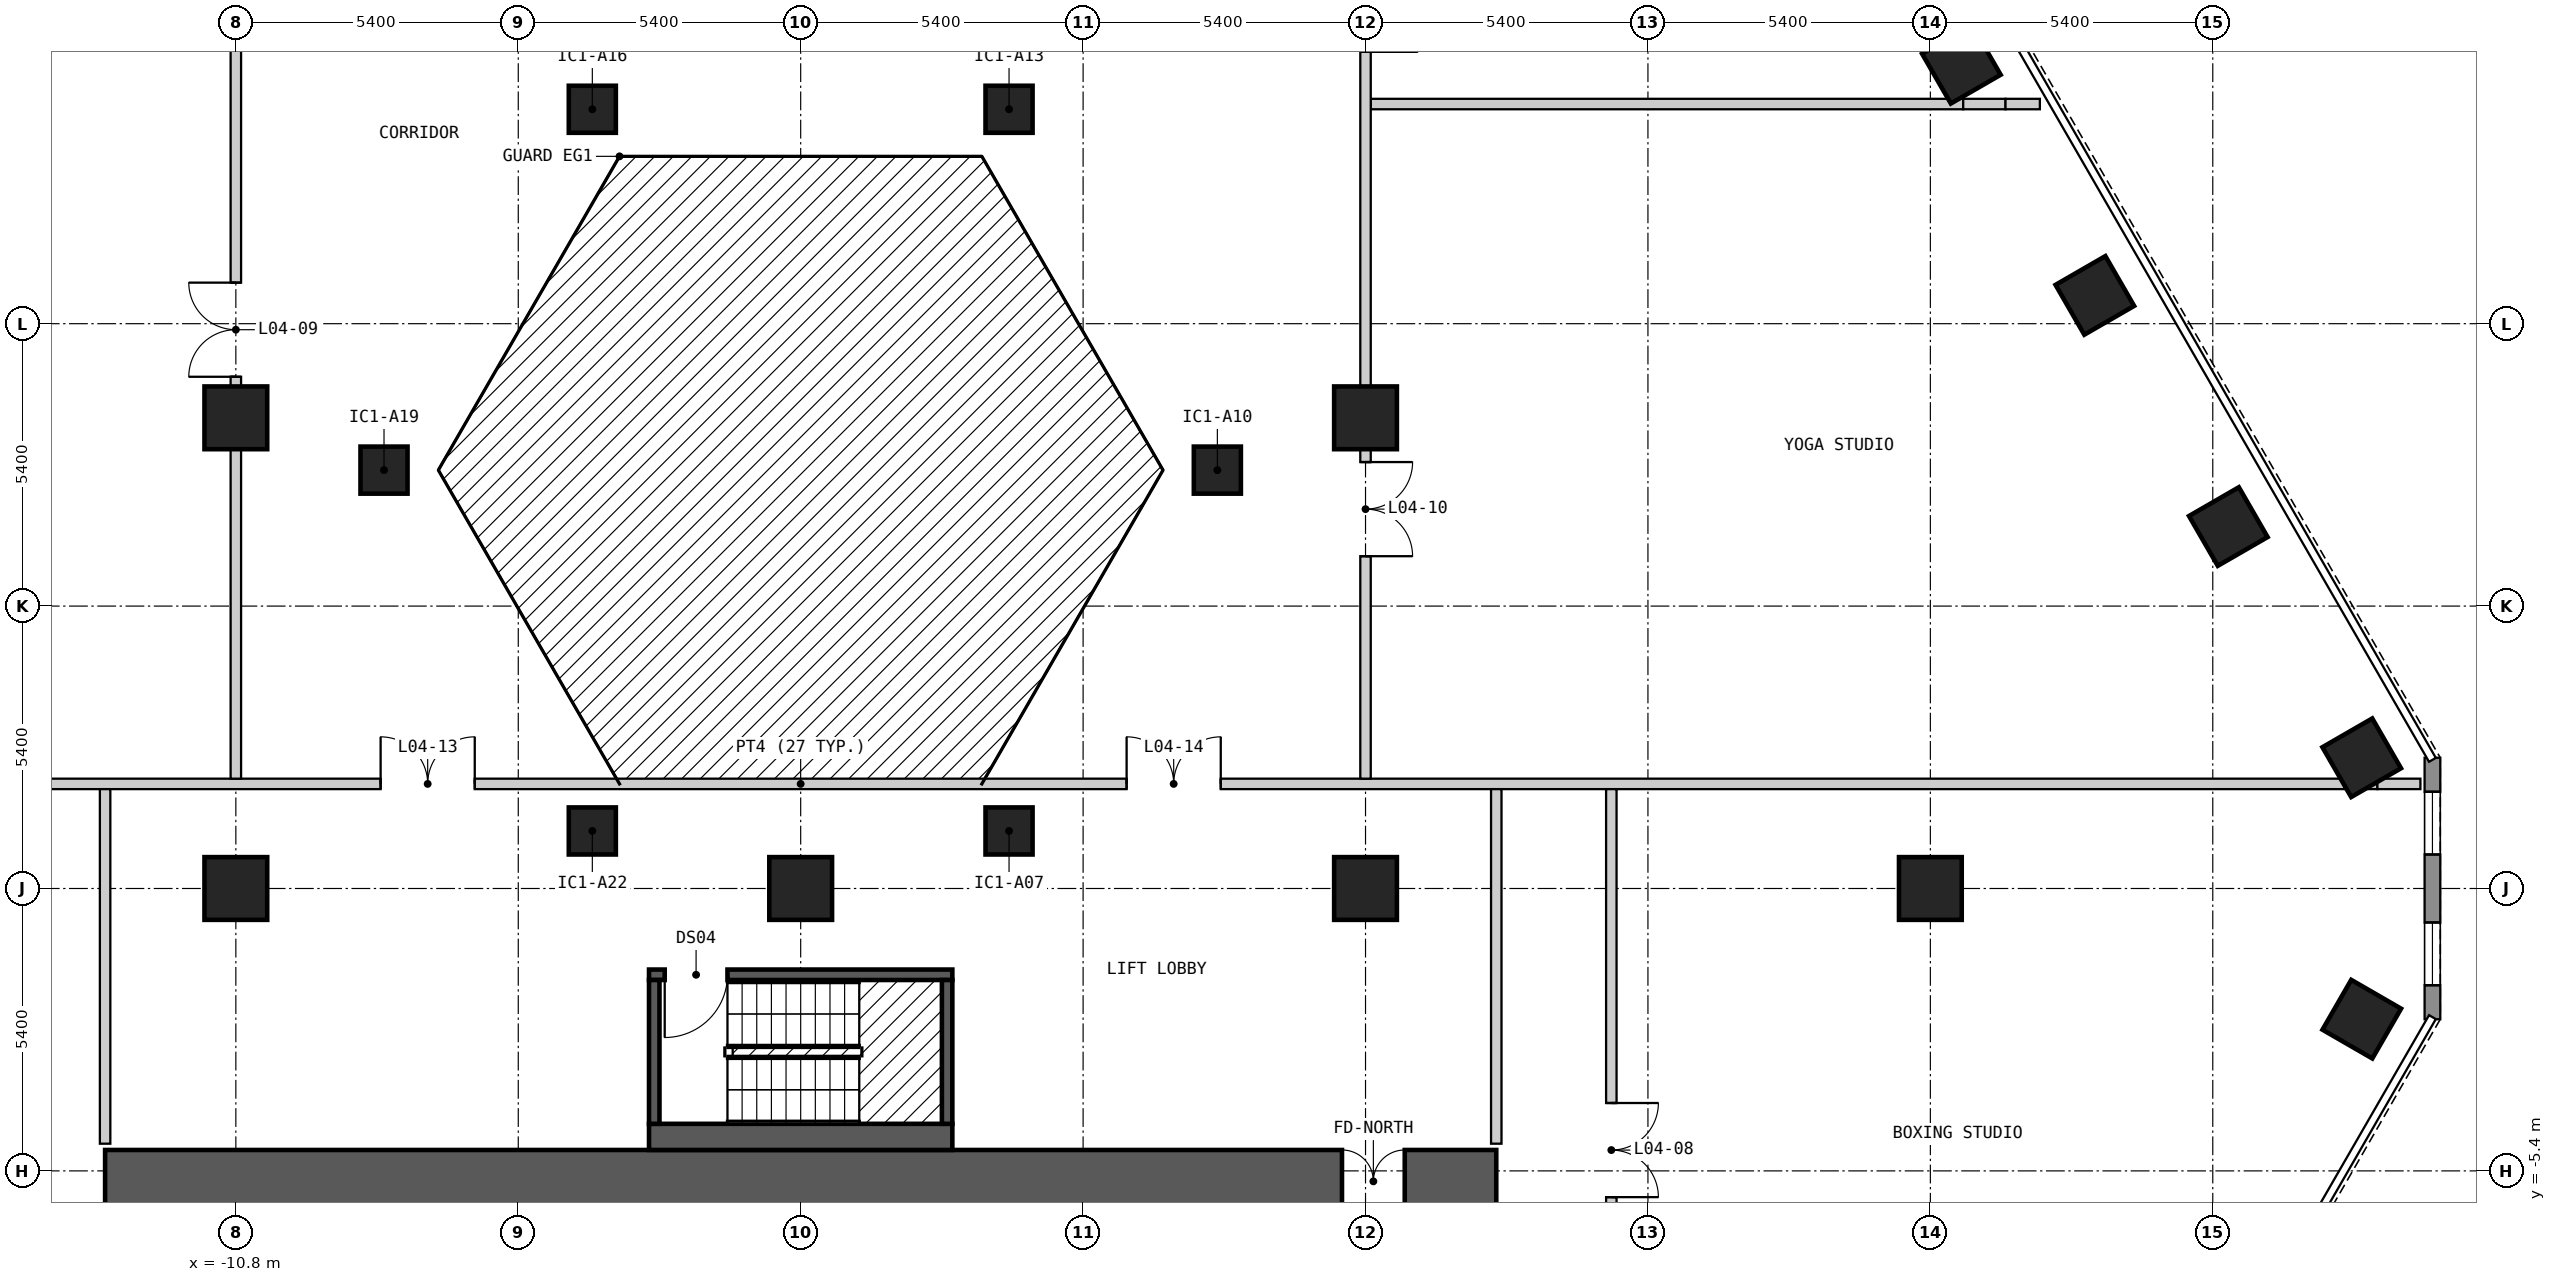
"""IFC4 building model, lengths in metres.
Left out: names, types, materials, properties, quantities, classifications, styles, units other than length and angle.
Written with IfcOpenShell. Run it as: python <this file> out.ifc"""

import sys

from ifc_helpers import new_model, si_unit, direction, frame, frame_2d, origin, origin_2d, place, context, subcontext, project, spatial, polyline, rectangle, outline, extrude, element, fill, save


model = new_model("IFC4")
c1 = context("Model", 3, precision=1e-05, world=origin(), true_north=direction((0.0, 1.0)))
c2 = subcontext(c1, "Body", "Model", "MODEL_VIEW")
j1 = project(units=[si_unit("LENGTHUNIT", "METRE"), si_unit("PLANEANGLEUNIT", "RADIAN")], contexts=[c1])
p1 = place(None, origin())
s1 = spatial("IfcSite", under=j1, at=p1, CompositionType="ELEMENT")
p2 = place(p1, origin())
s2 = spatial("IfcBuilding", under=s1, at=p2, CompositionType="ELEMENT")
p3 = place(p2, frame((0.0, 0.0, 16.2)))
s3 = spatial("IfcBuildingStorey", under=s2, at=p3, CompositionType="ELEMENT", Elevation=16.2)
for number, where, z_axis, x_axis in (
    (1, (29.849, -2.499, 0.0), (0.0, 0.0, 1.0), (0.5, 0.866, 0.0)),
    (2, (29.848, 2.5, 0.0), (0.0, 0.0, 1.0), (-0.5, 0.866, 0.0)),
    (3, (27.297, 6.921, 0.0), (0.0, 0.0, 1.0), (-0.5, 0.866, 0.0)),
    (4, (24.745, 11.341, 0.0), (0.0, 0.0, 1.0), (-0.5, 0.866, 0.0)),
    (5, (22.193, 15.761, 0.0), (0.0, 0.0, 1.0), (-0.5, 0.866, 0.0)),
):
    element("IfcColumn", number, at=place(p3, frame(where, z_axis=z_axis, x_axis=x_axis)), inside=s3, PredefinedType="COLUMN", context=c2, shape_type="SweptSolid", body=[
        extrude(rectangle(XDim=1.1, YDim=1.1, at=origin_2d()), origin(), (0.0, 0.0, 1.0), 3.6),
    ])
for number, where, z_axis, x_axis in (
    (6, (3.984, 1.1, 0.0), (0.0, 0.0, 1.0), (1.0, 0.0, 0.0)),
    (7, (7.967, 8.0, 0.0), (0.0, 0.0, 1.0), (1.0, 0.0, 0.0)),
    (8, (3.984, 14.9, 0.0), (0.0, 0.0, 1.0), (1.0, 0.0, 0.0)),
    (9, (-3.984, 14.9, 0.0), (0.0, 0.0, 1.0), (1.0, 0.0, 0.0)),
    (10, (-7.967, 8.0, 0.0), (0.0, 0.0, 1.0), (1.0, 0.0, 0.0)),
    (11, (-3.984, 1.1, 0.0), (0.0, 0.0, 1.0), (1.0, 0.0, 0.0)),
):
    element("IfcColumn", number, at=place(p3, frame(where, z_axis=z_axis, x_axis=x_axis)), inside=s3, PredefinedType="COLUMN", context=c2, shape_type="SweptSolid", body=[
        extrude(rectangle(XDim=0.9, YDim=0.9, at=origin_2d()), origin(), (0.0, 0.0, 1.0), 3.6),
    ])
for number, where, z_axis, x_axis in (
    (12, (-10.8, 0.0, 0.0), (0.0, 0.0, 1.0), (1.0, 0.0, 0.0)),
    (13, (-10.8, 9.0, 0.0), (0.0, 0.0, 1.0), (1.0, 0.0, 0.0)),
    (14, (0.0, 0.0, 0.0), (0.0, 0.0, 1.0), (1.0, 0.0, 0.0)),
    (15, (10.8, 0.0, 0.0), (0.0, 0.0, 1.0), (1.0, 0.0, 0.0)),
    (16, (10.8, 9.0, 0.0), (0.0, 0.0, 1.0), (1.0, 0.0, 0.0)),
    (17, (21.6, 0.0, 0.0), (0.0, 0.0, 1.0), (1.0, 0.0, 0.0)),
):
    element("IfcColumn", number, at=place(p3, frame(where, z_axis=z_axis, x_axis=x_axis)), inside=s3, PredefinedType="COLUMN", context=c2, shape_type="SweptSolid", body=[
        extrude(rectangle(XDim=1.2, YDim=1.2, at=origin_2d()), origin(), (0.0, 0.0, 1.0), 3.6),
    ])
p4 = place(p3, frame((-13.3, -5.6, 0.0), z_axis=(0.0, 0.0, 1.0), x_axis=(1.0, 0.0, 0.0)))
e18 = element("IfcWall", 18, at=p4, inside=s3, PredefinedType="SHEAR", context=c2, shape_type="SweptSolid", body=[
    extrude(rectangle(XDim=26.6, YDim=1.2, at=frame_2d((13.3, 0.0))), origin(), (0.0, 0.0, 1.0), 3.25),
])
p5 = place(p4, frame((23.65, 0.0, 0.0)))
e19 = element("IfcOpeningElement", 19, at=p5, cuts=e18, PredefinedType="OPENING", context=c2, shape_type="SweptSolid", body=[
    extrude(rectangle(XDim=1.2, YDim=2.1, at=frame_2d((0.6, 1.05))), frame((0.0, 0.61, 0.0), z_axis=(0.0, -1.0, 0.0), x_axis=(1.0, 0.0, 0.0)), (0.0, 0.0, 1.0), 1.22),
])
p6 = place(p3, frame((31.2, -2.5, 0.0), z_axis=(0.0, 0.0, 1.0), x_axis=(0.0, 1.0, 0.0)))
e20 = element("IfcWall", 20, at=p6, inside=s3, PredefinedType="SOLIDWALL", context=c2, shape_type="SweptSolid", body=[
    extrude(outline(polyline([(0.0, -0.15), (5.0, -0.15), (4.92, 0.15), (0.08, 0.15), (0.0, -0.15)])), origin(), (0.0, 0.0, 1.0), 3.25),
])
p7 = place(p6, frame((0.65, 0.0, 0.15)))
e21 = element("IfcOpeningElement", 21, at=p7, cuts=e20, PredefinedType="OPENING", context=c2, shape_type="SweptSolid", body=[
    extrude(rectangle(XDim=1.2, YDim=2.1, at=frame_2d((0.6, 1.05))), frame((0.0, 0.16, 0.0), z_axis=(0.0, -1.0, 0.0), x_axis=(1.0, 0.0, 0.0)), (0.0, 0.0, 1.0), 0.32),
])
p8 = place(p6, frame((3.15, 0.0, 0.15)))
e22 = element("IfcOpeningElement", 22, at=p8, cuts=e20, PredefinedType="OPENING", context=c2, shape_type="SweptSolid", body=[
    extrude(rectangle(XDim=1.2, YDim=2.1, at=frame_2d((0.6, 1.05))), frame((0.0, 0.16, 0.0), z_axis=(0.0, -1.0, 0.0), x_axis=(1.0, 0.0, 0.0)), (0.0, 0.0, 1.0), 0.32),
])
p9 = place(p3, frame((-2.9, -4.75, 0.0), z_axis=(0.0, 0.0, 1.0), x_axis=(1.0, 0.0, 0.0)))
e23 = element("IfcWall", 23, at=p9, inside=s3, PredefinedType="SOLIDWALL", context=c2, shape_type="SweptSolid", body=[
    extrude(rectangle(XDim=5.8, YDim=0.5, at=frame_2d((2.9, 0.0))), origin(), (0.0, 0.0, 1.0), 3.25),
])
p10 = place(p3, frame((-2.9, -1.65, 0.0), z_axis=(0.0, 0.0, 1.0), x_axis=(1.0, 0.0, 0.0)))
e24 = element("IfcWall", 24, at=p10, inside=s3, PredefinedType="SOLIDWALL", context=c2, shape_type="SweptSolid", body=[
    extrude(rectangle(XDim=5.8, YDim=0.2, at=frame_2d((2.9, 0.0))), origin(), (0.0, 0.0, 1.0), 3.25),
])
p11 = place(p10, frame((0.3, 0.0, 0.0)))
e25 = element("IfcOpeningElement", 25, at=p11, cuts=e24, PredefinedType="OPENING", context=c2, shape_type="SweptSolid", body=[
    extrude(rectangle(XDim=1.2, YDim=2.1, at=frame_2d((0.6, 1.05))), frame((0.0, 0.11, 0.0), z_axis=(0.0, -1.0, 0.0), x_axis=(1.0, 0.0, 0.0)), (0.0, 0.0, 1.0), 0.22),
])
for number, where, z_axis, x_axis in (
    (26, (-2.8, -4.5, 0.0), (0.0, 0.0, 1.0), (0.0, 1.0, 0.0)),
    (27, (2.8, -4.5, 0.0), (0.0, 0.0, 1.0), (0.0, 1.0, 0.0)),
):
    element("IfcWall", number, at=place(p3, frame(where, z_axis=z_axis, x_axis=x_axis)), inside=s3, PredefinedType="SOLIDWALL", context=c2, shape_type="SweptSolid", body=[
        extrude(rectangle(XDim=2.75, YDim=0.2, at=frame_2d((1.375, 0.0))), origin(), (0.0, 0.0, 1.0), 3.25),
    ])
p12 = place(p3, frame((-29.549, 2.0, 0.0), z_axis=(0.0, 0.0, 1.0), x_axis=(1.0, 0.0, 0.0)))
e28 = element("IfcWall", 28, at=p12, inside=s3, PredefinedType="PARTITIONING", context=c2, shape_type="SweptSolid", body=[
    extrude(rectangle(XDim=59.097, YDim=0.2, at=frame_2d((29.549, 0.0))), origin(), (0.0, 0.0, 1.0), 3.25),
])
p13 = place(p12, frame((21.517, 0.0, 0.0)))
e29 = element("IfcOpeningElement", 29, at=p13, cuts=e28, PredefinedType="OPENING", context=c2, shape_type="SweptSolid", body=[
    extrude(rectangle(XDim=1.8, YDim=2.1, at=frame_2d((0.9, 1.05))), frame((0.0, 0.11, 0.0), z_axis=(0.0, -1.0, 0.0), x_axis=(1.0, 0.0, 0.0)), (0.0, 0.0, 1.0), 0.22),
])
p14 = place(p12, frame((35.781, 0.0, 0.0)))
e30 = element("IfcOpeningElement", 30, at=p14, cuts=e28, PredefinedType="OPENING", context=c2, shape_type="SweptSolid", body=[
    extrude(rectangle(XDim=1.8, YDim=2.1, at=frame_2d((0.9, 1.05))), frame((0.0, 0.11, 0.0), z_axis=(0.0, -1.0, 0.0), x_axis=(1.0, 0.0, 0.0)), (0.0, 0.0, 1.0), 0.22),
])
p15 = place(p3, frame((29.548, 2.0, 0.0), z_axis=(0.0, 0.0, 1.0), x_axis=(1.0, 0.0, 0.0)))
e31 = element("IfcWall", 31, at=p15, inside=s3, PredefinedType="PARTITIONING", context=c2, shape_type="SweptSolid", body=[
    extrude(rectangle(XDim=0.6, YDim=0.2, at=frame_2d((0.3, 0.0))), origin(), (0.0, 0.0, 1.0), 2.52),
])
p16 = place(p3, frame((30.148, 2.0, 0.0), z_axis=(0.0, 0.0, 1.0), x_axis=(1.0, 0.0, 0.0)))
e32 = element("IfcWall", 32, at=p16, inside=s3, PredefinedType="PARTITIONING", context=c2, shape_type="SweptSolid", body=[
    extrude(rectangle(XDim=0.822, YDim=0.2, at=frame_2d((0.411, 0.0))), origin(), (0.0, 0.0, 1.0), 3.25),
])
p17 = place(p3, frame((10.9, 15.0, 0.0), z_axis=(0.0, 0.0, 1.0), x_axis=(1.0, 0.0, 0.0)))
e33 = element("IfcWall", 33, at=p17, inside=s3, PredefinedType="PARTITIONING", context=c2, shape_type="SweptSolid", body=[
    extrude(rectangle(XDim=11.328, YDim=0.2, at=frame_2d((5.664, 0.0))), origin(), (0.0, 0.0, 1.0), 3.25),
])
p18 = place(p3, frame((22.228, 15.0, 0.0), z_axis=(0.0, 0.0, 1.0), x_axis=(1.0, 0.0, 0.0)))
e34 = element("IfcWall", 34, at=p18, inside=s3, PredefinedType="PARTITIONING", context=c2, shape_type="SweptSolid", body=[
    extrude(rectangle(XDim=0.809, YDim=0.2, at=frame_2d((0.405, 0.0))), origin(), (0.0, 0.0, 1.0), 2.52),
])
p19 = place(p3, frame((23.037, 15.0, 0.0), z_axis=(0.0, 0.0, 1.0), x_axis=(1.0, 0.0, 0.0)))
e35 = element("IfcWall", 35, at=p19, inside=s3, PredefinedType="PARTITIONING", context=c2, shape_type="SweptSolid", body=[
    extrude(rectangle(XDim=0.657, YDim=0.2, at=frame_2d((0.329, 0.0))), origin(), (0.0, 0.0, 1.0), 3.25),
])
p20 = place(p3, frame((-13.3, -4.88, 0.0), z_axis=(0.0, 0.0, 1.0), x_axis=(0.0, 1.0, 0.0)))
e36 = element("IfcWall", 36, at=p20, inside=s3, PredefinedType="PARTITIONING", context=c2, shape_type="SweptSolid", body=[
    extrude(rectangle(XDim=6.78, YDim=0.2, at=frame_2d((3.39, 0.0))), origin(), (0.0, 0.0, 1.0), 3.25),
])
p21 = place(p3, frame((-10.8, 2.1, 0.0), z_axis=(0.0, 0.0, 1.0), x_axis=(0.0, 1.0, 0.0)))
e37 = element("IfcWall", 37, at=p21, inside=s3, PredefinedType="PARTITIONING", context=c2, shape_type="SweptSolid", body=[
    extrude(rectangle(XDim=24.7, YDim=0.2, at=frame_2d((12.35, 0.0))), origin(), (0.0, 0.0, 1.0), 3.25),
])
p22 = place(p21, frame((7.685, 0.0, 0.0)))
e38 = element("IfcOpeningElement", 38, at=p22, cuts=e37, PredefinedType="OPENING", context=c2, shape_type="SweptSolid", body=[
    extrude(rectangle(XDim=1.8, YDim=2.1, at=frame_2d((0.9, 1.05))), frame((0.0, 0.11, 0.0), z_axis=(0.0, -1.0, 0.0), x_axis=(1.0, 0.0, 0.0)), (0.0, 0.0, 1.0), 0.22),
])
p23 = place(p3, frame((10.8, 2.1, 0.0), z_axis=(0.0, 0.0, 1.0), x_axis=(0.0, 1.0, 0.0)))
e39 = element("IfcWall", 39, at=p23, inside=s3, PredefinedType="PARTITIONING", context=c2, shape_type="SweptSolid", body=[
    extrude(rectangle(XDim=24.7, YDim=0.2, at=frame_2d((12.35, 0.0))), origin(), (0.0, 0.0, 1.0), 3.25),
])
p24 = place(p23, frame((6.054, 0.0, 0.0), z_axis=(0.0, 0.0, 1.0), x_axis=(-1.0, 0.0, 0.0)))
e40 = element("IfcOpeningElement", 40, at=p24, cuts=e39, PredefinedType="OPENING", context=c2, shape_type="SweptSolid", body=[
    extrude(rectangle(XDim=1.8, YDim=2.1, at=frame_2d((0.9, 1.05))), frame((0.0, 0.11, 0.0), z_axis=(0.0, -1.0, 0.0), x_axis=(1.0, 0.0, 0.0)), (0.0, 0.0, 1.0), 0.22),
])
p25 = place(p23, frame((14.898, 0.0, 0.0), z_axis=(0.0, 0.0, 1.0), x_axis=(-1.0, 0.0, 0.0)))
e41 = element("IfcOpeningElement", 41, at=p25, cuts=e39, PredefinedType="OPENING", context=c2, shape_type="SweptSolid", body=[
    extrude(rectangle(XDim=1.0, YDim=2.1, at=frame_2d((0.5, 1.05))), frame((0.0, 0.11, 0.0), z_axis=(0.0, -1.0, 0.0), x_axis=(1.0, 0.0, 0.0)), (0.0, 0.0, 1.0), 0.22),
])
p26 = place(p3, frame((13.3, -4.88, 0.0), z_axis=(0.0, 0.0, 1.0), x_axis=(0.0, 1.0, 0.0)))
e42 = element("IfcWall", 42, at=p26, inside=s3, PredefinedType="PARTITIONING", context=c2, shape_type="SweptSolid", body=[
    extrude(rectangle(XDim=6.78, YDim=0.2, at=frame_2d((3.39, 0.0))), origin(), (0.0, 0.0, 1.0), 3.25),
])
p27 = place(p3, frame((15.5, -25.114, 0.0), z_axis=(0.0, 0.0, 1.0), x_axis=(0.0, 1.0, 0.0)))
e43 = element("IfcWall", 43, at=p27, inside=s3, PredefinedType="PARTITIONING", context=c2, shape_type="SweptSolid", body=[
    extrude(rectangle(XDim=27.014, YDim=0.2, at=frame_2d((13.507, 0.0))), origin(), (0.0, 0.0, 1.0), 3.25),
])
p28 = place(p27, frame((9.016, 0.0, 0.0), z_axis=(0.0, 0.0, 1.0), x_axis=(-1.0, 0.0, 0.0)))
e44 = element("IfcOpeningElement", 44, at=p28, cuts=e43, PredefinedType="OPENING", context=c2, shape_type="SweptSolid", body=[
    extrude(rectangle(XDim=1.0, YDim=2.1, at=frame_2d((0.5, 1.05))), frame((0.0, 0.11, 0.0), z_axis=(0.0, -1.0, 0.0), x_axis=(1.0, 0.0, 0.0)), (0.0, 0.0, 1.0), 0.22),
])
p29 = place(p27, frame((21.012, 0.0, 0.0), z_axis=(0.0, 0.0, 1.0), x_axis=(-1.0, 0.0, 0.0)))
e45 = element("IfcOpeningElement", 45, at=p29, cuts=e43, PredefinedType="OPENING", context=c2, shape_type="SweptSolid", body=[
    extrude(rectangle(XDim=1.8, YDim=2.1, at=frame_2d((0.9, 1.05))), frame((0.0, 0.11, 0.0), z_axis=(0.0, -1.0, 0.0), x_axis=(1.0, 0.0, 0.0)), (0.0, 0.0, 1.0), 0.22),
])
p30 = place(p7, origin())
e46 = element("IfcWindow", 46, at=p30, inside=s3, PartitioningType="SINGLE_PANEL", PredefinedType="WINDOW", context=c2, shape_type="SweptSolid", body=[
    extrude(rectangle(XDim=1.2, YDim=2.1, at=frame_2d((0.6, 1.05))), frame((0.0, 0.03, 0.0), z_axis=(0.0, -1.0, 0.0), x_axis=(1.0, 0.0, 0.0)), (0.0, 0.0, 1.0), 0.06),
])
fill(e21, e46)
p31 = place(p8, origin())
e47 = element("IfcWindow", 47, at=p31, inside=s3, PartitioningType="SINGLE_PANEL", PredefinedType="WINDOW", context=c2, shape_type="SweptSolid", body=[
    extrude(rectangle(XDim=1.2, YDim=2.1, at=frame_2d((0.6, 1.05))), frame((0.0, 0.03, 0.0), z_axis=(0.0, -1.0, 0.0), x_axis=(1.0, 0.0, 0.0)), (0.0, 0.0, 1.0), 0.06),
])
fill(e22, e47)
p32 = place(p11, origin())
e48 = element("IfcDoor", 48, at=p32, inside=s3, OperationType="SINGLE_SWING_LEFT", PredefinedType="DOOR", context=c2, shape_type="SweptSolid", body=[
    extrude(rectangle(XDim=1.2, YDim=2.1, at=frame_2d((0.6, 1.05))), frame((0.0, 0.025, 0.0), z_axis=(0.0, -1.0, 0.0), x_axis=(1.0, 0.0, 0.0)), (0.0, 0.0, 1.0), 0.05),
])
fill(e25, e48)
p33 = place(p29, origin())
e49 = element("IfcDoor", 49, at=p33, inside=s3, OperationType="DOUBLE_DOOR_SINGLE_SWING", PredefinedType="DOOR", context=c2, shape_type="SweptSolid", body=[
    extrude(rectangle(XDim=1.8, YDim=2.1, at=frame_2d((0.9, 1.05))), frame((0.0, 0.025, 0.0), z_axis=(0.0, -1.0, 0.0), x_axis=(1.0, 0.0, 0.0)), (0.0, 0.0, 1.0), 0.05),
])
fill(e45, e49)
p34 = place(p22, origin())
e50 = element("IfcDoor", 50, at=p34, inside=s3, OperationType="DOUBLE_DOOR_SINGLE_SWING", PredefinedType="DOOR", context=c2, shape_type="SweptSolid", body=[
    extrude(rectangle(XDim=1.8, YDim=2.1, at=frame_2d((0.9, 1.05))), frame((0.0, 0.025, 0.0), z_axis=(0.0, -1.0, 0.0), x_axis=(1.0, 0.0, 0.0)), (0.0, 0.0, 1.0), 0.05),
])
fill(e38, e50)
p35 = place(p24, origin())
e51 = element("IfcDoor", 51, at=p35, inside=s3, OperationType="DOUBLE_DOOR_SINGLE_SWING", PredefinedType="DOOR", context=c2, shape_type="SweptSolid", body=[
    extrude(rectangle(XDim=1.8, YDim=2.1, at=frame_2d((0.9, 1.05))), frame((0.0, 0.025, 0.0), z_axis=(0.0, -1.0, 0.0), x_axis=(1.0, 0.0, 0.0)), (0.0, 0.0, 1.0), 0.05),
])
fill(e40, e51)
p36 = place(p25, origin())
e52 = element("IfcDoor", 52, at=p36, inside=s3, OperationType="SINGLE_SWING_RIGHT", PredefinedType="DOOR", context=c2, shape_type="SweptSolid", body=[
    extrude(rectangle(XDim=1.0, YDim=2.1, at=frame_2d((0.5, 1.05))), frame((0.0, 0.025, 0.0), z_axis=(0.0, -1.0, 0.0), x_axis=(1.0, 0.0, 0.0)), (0.0, 0.0, 1.0), 0.05),
])
fill(e41, e52)
p37 = place(p13, origin())
e53 = element("IfcDoor", 53, at=p37, inside=s3, OperationType="DOUBLE_DOOR_SINGLE_SWING", PredefinedType="DOOR", context=c2, shape_type="SweptSolid", body=[
    extrude(rectangle(XDim=1.8, YDim=2.1, at=frame_2d((0.9, 1.05))), frame((0.0, 0.025, 0.0), z_axis=(0.0, -1.0, 0.0), x_axis=(1.0, 0.0, 0.0)), (0.0, 0.0, 1.0), 0.05),
])
fill(e29, e53)
p38 = place(p14, origin())
e54 = element("IfcDoor", 54, at=p38, inside=s3, OperationType="DOUBLE_DOOR_SINGLE_SWING", PredefinedType="DOOR", context=c2, shape_type="SweptSolid", body=[
    extrude(rectangle(XDim=1.8, YDim=2.1, at=frame_2d((0.9, 1.05))), frame((0.0, 0.025, 0.0), z_axis=(0.0, -1.0, 0.0), x_axis=(1.0, 0.0, 0.0)), (0.0, 0.0, 1.0), 0.05),
])
fill(e30, e54)
p39 = place(p5, origin())
e55 = element("IfcDoor", 55, at=p39, inside=s3, OperationType="DOUBLE_DOOR_SINGLE_SWING", PredefinedType="DOOR", context=c2, shape_type="SweptSolid", body=[
    extrude(rectangle(XDim=1.2, YDim=2.1, at=frame_2d((0.6, 1.05))), frame((0.0, 0.025, 0.0), z_axis=(0.0, -1.0, 0.0), x_axis=(1.0, 0.0, 0.0)), (0.0, 0.0, 1.0), 0.05),
])
fill(e19, e55)
save(model, sys.argv[1])
